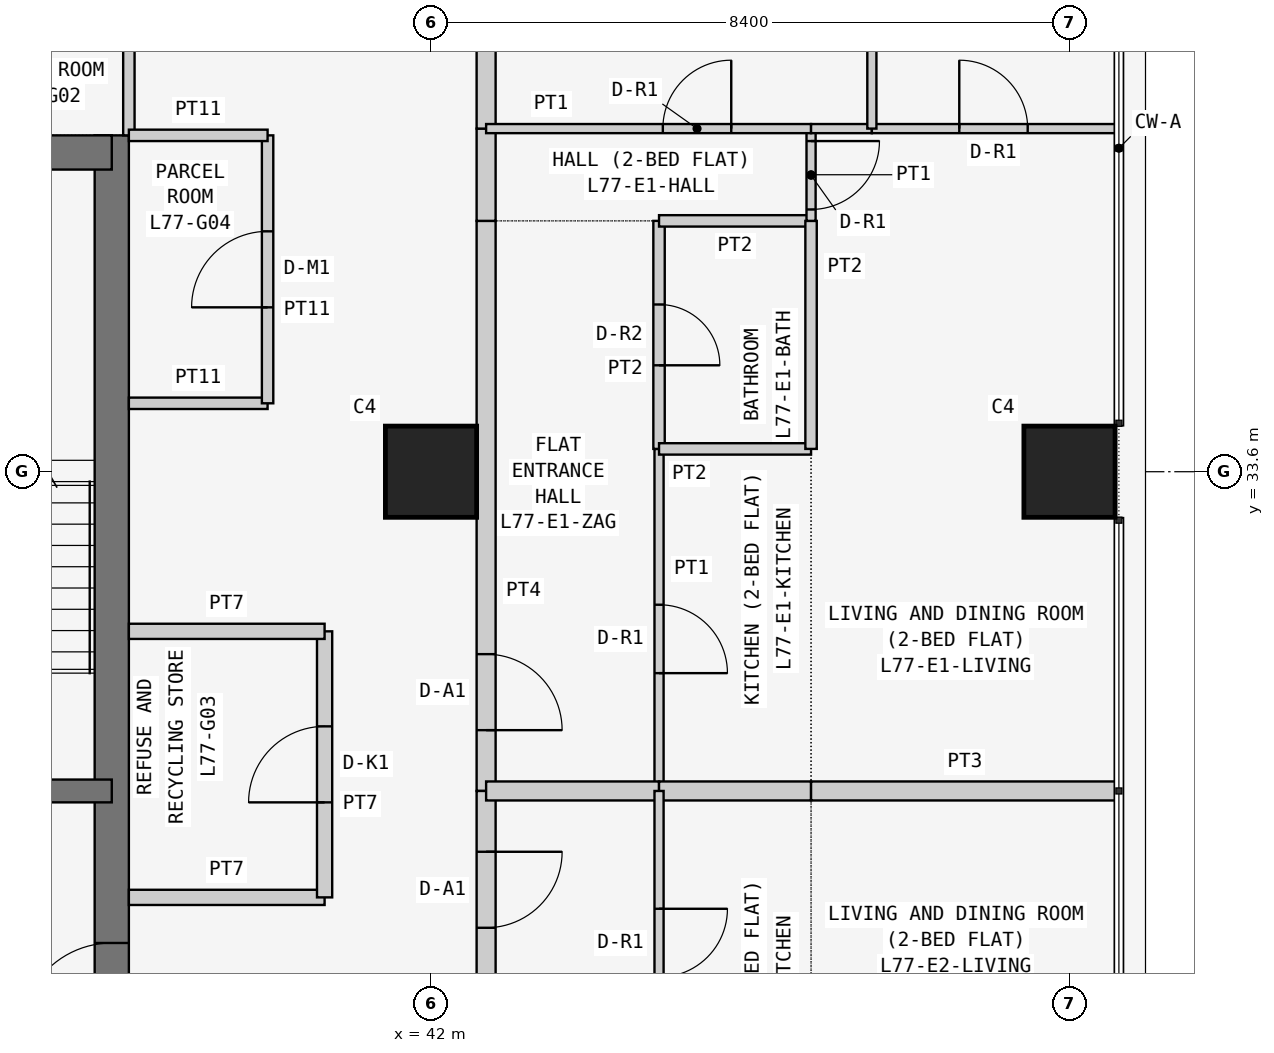
"""IFC4 building model, lengths in metres.
Left out: names, types, materials, properties, quantities, classifications, styles, units other than length and angle.
Written with IfcOpenShell. Run it as: python <this file> out.ifc"""

import sys

from ifc_helpers import new_model, si_unit, direction, frame, frame_2d, origin, origin_2d, place, context, subcontext, project, spatial, rectangle, extrude, element, fill, save


model = new_model("IFC4")
c1 = context("Model", 3, precision=1e-05, world=origin(), true_north=direction((0.0, 1.0)))
c2 = subcontext(c1, "Body", "Model", "MODEL_VIEW")
j1 = project(units=[si_unit("LENGTHUNIT", "METRE"), si_unit("PLANEANGLEUNIT", "RADIAN")], contexts=[c1])
p1 = place(None, origin())
s1 = spatial("IfcSite", under=j1, at=p1, CompositionType="ELEMENT")
p2 = place(p1, origin())
s2 = spatial("IfcBuilding", under=s1, at=p2, CompositionType="ELEMENT")
p3 = place(p2, frame((0.0, 0.0, 293.7)))
s3 = spatial("IfcBuildingStorey", under=s2, at=p3, CompositionType="ELEMENT", Elevation=293.7)
for number, where, z_axis, x_axis in (
    (1, (42.0, 33.6, 0.0), (0.0, 0.0, 1.0), (1.0, 0.0, 0.0)),
    (2, (50.4, 33.6, 0.0), (0.0, 0.0, 1.0), (1.0, 0.0, 0.0)),
):
    element("IfcColumn", number, at=place(p3, frame(where, z_axis=z_axis, x_axis=x_axis)), inside=s3, PredefinedType="COLUMN", context=c2, shape_type="SweptSolid", body=[
        extrude(rectangle(XDim=1.2, YDim=1.2, at=origin_2d()), origin(), (0.0, 0.0, 1.0), 3.6),
    ])
p4 = place(p3, frame((37.8, 21.0, 0.0), z_axis=(0.0, 0.0, 1.0), x_axis=(0.0, 1.0, 0.0)))
e3 = element("IfcWall", 3, at=p4, inside=s3, PredefinedType="SHEAR", context=c2, shape_type="SweptSolid", body=[
    extrude(rectangle(XDim=17.025, YDim=0.45, at=frame_2d((8.512, 0.0))), origin(), (0.0, 0.0, 1.0), 3.6),
])
p5 = place(p4, frame((5.2, 0.0, 0.0)))
e4 = element("IfcOpeningElement", 4, at=p5, cuts=e3, PredefinedType="OPENING", context=c2, shape_type="SweptSolid", body=[
    extrude(rectangle(XDim=1.2, YDim=2.1, at=frame_2d((0.6, 1.05))), frame((0.0, 0.235, 0.0), z_axis=(0.0, -1.0, 0.0), x_axis=(1.0, 0.0, 0.0)), (0.0, 0.0, 1.0), 0.47),
])
p6 = place(p3, frame((37.8, 37.8, 0.0), z_axis=(0.0, 0.0, 1.0), x_axis=(-1.0, 0.0, 0.0)))
e5 = element("IfcWall", 5, at=p6, inside=s3, PredefinedType="SHEAR", context=c2, shape_type="SweptSolid", body=[
    extrude(rectangle(XDim=17.025, YDim=0.45, at=frame_2d((8.513, 0.0))), origin(), (0.0, 0.0, 1.0), 3.6),
])
p7 = place(p3, frame((32.2, 29.4, 0.0), z_axis=(0.0, 0.0, 1.0), x_axis=(1.0, 0.0, 0.0)))
e6 = element("IfcWall", 6, at=p7, inside=s3, PredefinedType="SHEAR", context=c2, shape_type="SweptSolid", body=[
    extrude(rectangle(XDim=5.6, YDim=0.3, at=frame_2d((2.8, 0.0))), origin(), (0.0, 0.0, 1.0), 3.6),
])
p8 = place(p7, frame((2.0, 0.0, 0.0)))
e7 = element("IfcOpeningElement", 7, at=p8, cuts=e6, PredefinedType="OPENING", context=c2, shape_type="SweptSolid", body=[
    extrude(rectangle(XDim=1.2, YDim=2.1, at=frame_2d((0.6, 1.05))), frame((0.0, 0.16, 0.0), z_axis=(0.0, -1.0, 0.0), x_axis=(1.0, 0.0, 0.0)), (0.0, 0.0, 1.0), 0.32),
])
p9 = place(p3, frame((38.025, 38.025, 0.0), z_axis=(0.0, 0.0, 1.0), x_axis=(0.0, 1.0, 0.0)))
e8 = element("IfcWall", 8, at=p9, inside=s3, PredefinedType="PARTITIONING", context=c2, shape_type="SweptSolid", body=[
    extrude(rectangle(XDim=2.575, YDim=0.15, at=frame_2d((1.288, 0.0))), origin(), (0.0, 0.0, 1.0), 3.45),
])
p10 = place(p3, frame((38.025, 28.0, 0.0), z_axis=(0.0, 0.0, 1.0), x_axis=(1.0, 0.0, 0.0)))
e9 = element("IfcWall", 9, at=p10, inside=s3, PredefinedType="PARTITIONING", context=c2, shape_type="SweptSolid", body=[
    extrude(rectangle(XDim=2.575, YDim=0.2, at=frame_2d((1.288, 0.0))), origin(), (0.0, 0.0, 1.0), 3.45),
])
p11 = place(p3, frame((40.6, 28.0, 0.0), z_axis=(0.0, 0.0, 1.0), x_axis=(0.0, 1.0, 0.0)))
e10 = element("IfcWall", 10, at=p11, inside=s3, PredefinedType="PARTITIONING", context=c2, shape_type="SweptSolid", body=[
    extrude(rectangle(XDim=3.5, YDim=0.2, at=frame_2d((1.75, 0.0))), origin(), (0.0, 0.0, 1.0), 3.45),
])
p12 = place(p11, frame((1.25, 0.0, 0.0)))
e11 = element("IfcOpeningElement", 11, at=p12, cuts=e10, PredefinedType="OPENING", context=c2, shape_type="SweptSolid", body=[
    extrude(rectangle(XDim=1.0, YDim=2.1, at=frame_2d((0.5, 1.05))), frame((0.0, 0.11, 0.0), z_axis=(0.0, -1.0, 0.0), x_axis=(1.0, 0.0, 0.0)), (0.0, 0.0, 1.0), 0.22),
])
p13 = place(p3, frame((40.6, 31.5, 0.0), z_axis=(0.0, 0.0, 1.0), x_axis=(-1.0, 0.0, 0.0)))
e12 = element("IfcWall", 12, at=p13, inside=s3, PredefinedType="PARTITIONING", context=c2, shape_type="SweptSolid", body=[
    extrude(rectangle(XDim=2.575, YDim=0.2, at=frame_2d((1.288, 0.0))), origin(), (0.0, 0.0, 1.0), 3.45),
])
p14 = place(p3, frame((38.025, 34.5, 0.0), z_axis=(0.0, 0.0, 1.0), x_axis=(1.0, 0.0, 0.0)))
e13 = element("IfcWall", 13, at=p14, inside=s3, PredefinedType="PARTITIONING", context=c2, shape_type="SweptSolid", body=[
    extrude(rectangle(XDim=1.825, YDim=0.15, at=frame_2d((0.913, 0.0))), origin(), (0.0, 0.0, 1.0), 3.45),
])
p15 = place(p3, frame((39.85, 34.5, 0.0), z_axis=(0.0, 0.0, 1.0), x_axis=(0.0, 1.0, 0.0)))
e14 = element("IfcWall", 14, at=p15, inside=s3, PredefinedType="PARTITIONING", context=c2, shape_type="SweptSolid", body=[
    extrude(rectangle(XDim=3.525, YDim=0.15, at=frame_2d((1.762, 0.0))), origin(), (0.0, 0.0, 1.0), 3.45),
])
p16 = place(p15, frame((1.262, 0.0, 0.0)))
e15 = element("IfcOpeningElement", 15, at=p16, cuts=e14, PredefinedType="OPENING", context=c2, shape_type="SweptSolid", body=[
    extrude(rectangle(XDim=1.0, YDim=2.1, at=frame_2d((0.5, 1.05))), frame((0.0, 0.085, 0.0), z_axis=(0.0, -1.0, 0.0), x_axis=(1.0, 0.0, 0.0)), (0.0, 0.0, 1.0), 0.17),
])
p17 = place(p3, frame((39.85, 38.025, 0.0), z_axis=(0.0, 0.0, 1.0), x_axis=(-1.0, 0.0, 0.0)))
e16 = element("IfcWall", 16, at=p17, inside=s3, PredefinedType="PARTITIONING", context=c2, shape_type="SweptSolid", body=[
    extrude(rectangle(XDim=1.825, YDim=0.15, at=frame_2d((0.913, 0.0))), origin(), (0.0, 0.0, 1.0), 3.45),
])
p18 = place(p3, frame((42.725, 36.9, 0.0), z_axis=(0.0, 0.0, 1.0), x_axis=(0.0, -1.0, 0.0)))
e17 = element("IfcWall", 17, at=p18, inside=s3, PredefinedType="PARTITIONING", context=c2, shape_type="SweptSolid", body=[
    extrude(rectangle(XDim=7.5, YDim=0.25, at=frame_2d((3.75, 0.0))), origin(), (0.0, 0.0, 1.0), 3.45),
])
p19 = place(p18, frame((5.7, 0.0, 0.0)))
e18 = element("IfcOpeningElement", 18, at=p19, cuts=e17, PredefinedType="OPENING", context=c2, shape_type="SweptSolid", body=[
    extrude(rectangle(XDim=1.0, YDim=2.1, at=frame_2d((0.5, 1.05))), frame((0.0, 0.135, 0.0), z_axis=(0.0, -1.0, 0.0), x_axis=(1.0, 0.0, 0.0)), (0.0, 0.0, 1.0), 0.27),
])
p20 = place(p3, frame((42.725, 38.114, 0.0), z_axis=(0.0, 0.0, 1.0), x_axis=(0.0, -1.0, 0.0)))
e19 = element("IfcWall", 19, at=p20, inside=s3, PredefinedType="PARTITIONING", context=c2, shape_type="SweptSolid", body=[
    extrude(rectangle(XDim=1.214, YDim=0.25, at=frame_2d((0.607, 0.0))), origin(), (0.0, 0.0, 1.0), 3.45),
])
p21 = place(p3, frame((42.725, 42.7, 0.0), z_axis=(0.0, 0.0, 1.0), x_axis=(0.0, -1.0, 0.0)))
e20 = element("IfcWall", 20, at=p21, inside=s3, PredefinedType="PARTITIONING", context=c2, shape_type="SweptSolid", body=[
    extrude(rectangle(XDim=4.586, YDim=0.25, at=frame_2d((2.293, 0.0))), origin(), (0.0, 0.0, 1.0), 3.45),
])
p22 = place(p3, frame((42.725, 29.4, 0.0), z_axis=(0.0, 0.0, 1.0), x_axis=(0.0, -1.0, 0.0)))
e21 = element("IfcWall", 21, at=p22, inside=s3, PredefinedType="PARTITIONING", context=c2, shape_type="SweptSolid", body=[
    extrude(rectangle(XDim=7.5, YDim=0.25, at=frame_2d((3.75, 0.0))), origin(), (0.0, 0.0, 1.0), 3.45),
])
p23 = place(p22, frame((0.8, 0.0, 0.0)))
e22 = element("IfcOpeningElement", 22, at=p23, cuts=e21, PredefinedType="OPENING", context=c2, shape_type="SweptSolid", body=[
    extrude(rectangle(XDim=1.0, YDim=2.1, at=frame_2d((0.5, 1.05))), frame((0.0, 0.135, 0.0), z_axis=(0.0, -1.0, 0.0), x_axis=(1.0, 0.0, 0.0)), (0.0, 0.0, 1.0), 0.27),
])
p24 = place(p3, frame((45.0, 29.4, 0.0), z_axis=(0.0, 0.0, 1.0), x_axis=(0.0, 1.0, 0.0)))
e23 = element("IfcWall", 23, at=p24, inside=s3, PredefinedType="PARTITIONING", context=c2, shape_type="SweptSolid", body=[
    extrude(rectangle(XDim=4.5, YDim=0.12, at=frame_2d((2.25, 0.0))), origin(), (0.0, 0.0, 1.0), 3.45),
])
p25 = place(p24, frame((1.55, 0.0, 0.0)))
e24 = element("IfcOpeningElement", 24, at=p25, cuts=e23, PredefinedType="OPENING", context=c2, shape_type="SweptSolid", body=[
    extrude(rectangle(XDim=0.9, YDim=2.1, at=frame_2d((0.45, 1.05))), frame((0.0, 0.07, 0.0), z_axis=(0.0, -1.0, 0.0), x_axis=(1.0, 0.0, 0.0)), (0.0, 0.0, 1.0), 0.14),
])
p26 = place(p3, frame((45.0, 33.9, 0.0), z_axis=(0.0, 0.0, 1.0), x_axis=(0.0, 1.0, 0.0)))
e25 = element("IfcWall", 25, at=p26, inside=s3, PredefinedType="PARTITIONING", context=c2, shape_type="SweptSolid", body=[
    extrude(rectangle(XDim=3.0, YDim=0.15, at=frame_2d((1.5, 0.0))), origin(), (0.0, 0.0, 1.0), 3.45),
])
p27 = place(p26, frame((1.1, 0.0, 0.0)))
e26 = element("IfcOpeningElement", 26, at=p27, cuts=e25, PredefinedType="OPENING", context=c2, shape_type="SweptSolid", body=[
    extrude(rectangle(XDim=0.8, YDim=2.1, at=frame_2d((0.4, 1.05))), frame((0.0, 0.085, 0.0), z_axis=(0.0, -1.0, 0.0), x_axis=(1.0, 0.0, 0.0)), (0.0, 0.0, 1.0), 0.17),
])
p28 = place(p3, frame((42.725, 29.4, 0.0), z_axis=(0.0, 0.0, 1.0), x_axis=(1.0, 0.0, 0.0)))
e27 = element("IfcWall", 27, at=p28, inside=s3, PredefinedType="PARTITIONING", context=c2, shape_type="SweptSolid", body=[
    extrude(rectangle(XDim=2.275, YDim=0.25, at=frame_2d((1.137, 0.0))), origin(), (0.0, 0.0, 1.0), 3.45),
])
p29 = place(p3, frame((47.0, 33.9, 0.0), z_axis=(0.0, 0.0, 1.0), x_axis=(-1.0, 0.0, 0.0)))
e28 = element("IfcWall", 28, at=p29, inside=s3, PredefinedType="PARTITIONING", context=c2, shape_type="SweptSolid", body=[
    extrude(rectangle(XDim=2.0, YDim=0.15, at=frame_2d((1.0, 0.0))), origin(), (0.0, 0.0, 1.0), 3.45),
])
p30 = place(p3, frame((45.0, 29.4, 0.0), z_axis=(0.0, 0.0, 1.0), x_axis=(1.0, 0.0, 0.0)))
e29 = element("IfcWall", 29, at=p30, inside=s3, PredefinedType="PARTITIONING", context=c2, shape_type="SweptSolid", body=[
    extrude(rectangle(XDim=2.0, YDim=0.25, at=frame_2d((1.0, 0.0))), origin(), (0.0, 0.0, 1.0), 3.45),
])
p31 = place(p3, frame((47.0, 36.9, 0.0), z_axis=(0.0, 0.0, 1.0), x_axis=(-1.0, 0.0, 0.0)))
e30 = element("IfcWall", 30, at=p31, inside=s3, PredefinedType="PARTITIONING", context=c2, shape_type="SweptSolid", body=[
    extrude(rectangle(XDim=2.0, YDim=0.15, at=frame_2d((1.0, 0.0))), origin(), (0.0, 0.0, 1.0), 3.45),
])
p32 = place(p3, frame((47.0, 33.9, 0.0), z_axis=(0.0, 0.0, 1.0), x_axis=(0.0, 1.0, 0.0)))
e31 = element("IfcWall", 31, at=p32, inside=s3, PredefinedType="PARTITIONING", context=c2, shape_type="SweptSolid", body=[
    extrude(rectangle(XDim=3.0, YDim=0.15, at=frame_2d((1.5, 0.0))), origin(), (0.0, 0.0, 1.0), 3.45),
])
p33 = place(p3, frame((47.0, 36.9, 0.0), z_axis=(0.0, 0.0, 1.0), x_axis=(0.0, 1.0, 0.0)))
e32 = element("IfcWall", 32, at=p33, inside=s3, PredefinedType="PARTITIONING", context=c2, shape_type="SweptSolid", body=[
    extrude(rectangle(XDim=1.214, YDim=0.12, at=frame_2d((0.607, 0.0))), origin(), (0.0, 0.0, 1.0), 3.45),
])
p34 = place(p33, frame((0.15, 0.0, 0.0)))
e33 = element("IfcOpeningElement", 33, at=p34, cuts=e32, PredefinedType="OPENING", context=c2, shape_type="SweptSolid", body=[
    extrude(rectangle(XDim=0.9, YDim=2.1, at=frame_2d((0.45, 1.05))), frame((0.0, 0.07, 0.0), z_axis=(0.0, -1.0, 0.0), x_axis=(1.0, 0.0, 0.0)), (0.0, 0.0, 1.0), 0.14),
])
p35 = place(p3, frame((47.0, 38.114, 0.0), z_axis=(0.0, 0.0, 1.0), x_axis=(-1.0, 0.0, 0.0)))
e34 = element("IfcWall", 34, at=p35, inside=s3, PredefinedType="PARTITIONING", context=c2, shape_type="SweptSolid", body=[
    extrude(rectangle(XDim=4.275, YDim=0.12, at=frame_2d((2.137, 0.0))), origin(), (0.0, 0.0, 1.0), 3.45),
])
p36 = place(p35, frame((1.05, 0.0, 0.0)))
e35 = element("IfcOpeningElement", 35, at=p36, cuts=e34, PredefinedType="OPENING", context=c2, shape_type="SweptSolid", body=[
    extrude(rectangle(XDim=0.9, YDim=2.1, at=frame_2d((0.45, 1.05))), frame((0.0, 0.07, 0.0), z_axis=(0.0, -1.0, 0.0), x_axis=(1.0, 0.0, 0.0)), (0.0, 0.0, 1.0), 0.14),
])
p37 = place(p3, frame((47.8, 38.114, 0.0), z_axis=(0.0, 0.0, 1.0), x_axis=(-1.0, 0.0, 0.0)))
e36 = element("IfcWall", 36, at=p37, inside=s3, PredefinedType="PARTITIONING", context=c2, shape_type="SweptSolid", body=[
    extrude(rectangle(XDim=0.8, YDim=0.12, at=frame_2d((0.4, 0.0))), origin(), (0.0, 0.0, 1.0), 3.45),
])
p38 = place(p3, frame((51.05, 38.114, 0.0), z_axis=(0.0, 0.0, 1.0), x_axis=(-1.0, 0.0, 0.0)))
e37 = element("IfcWall", 37, at=p38, inside=s3, PredefinedType="PARTITIONING", context=c2, shape_type="SweptSolid", body=[
    extrude(rectangle(XDim=3.25, YDim=0.12, at=frame_2d((1.625, 0.0))), origin(), (0.0, 0.0, 1.0), 3.45),
])
p39 = place(p38, frame((1.2, 0.0, 0.0)))
e38 = element("IfcOpeningElement", 38, at=p39, cuts=e37, PredefinedType="OPENING", context=c2, shape_type="SweptSolid", body=[
    extrude(rectangle(XDim=0.9, YDim=2.1, at=frame_2d((0.45, 1.05))), frame((0.0, 0.07, 0.0), z_axis=(0.0, -1.0, 0.0), x_axis=(1.0, 0.0, 0.0)), (0.0, 0.0, 1.0), 0.14),
])
p40 = place(p3, frame((47.0, 29.4, 0.0), z_axis=(0.0, 0.0, 1.0), x_axis=(1.0, 0.0, 0.0)))
e39 = element("IfcWall", 39, at=p40, inside=s3, PredefinedType="PARTITIONING", context=c2, shape_type="SweptSolid", body=[
    extrude(rectangle(XDim=4.05, YDim=0.25, at=frame_2d((2.025, 0.0))), origin(), (0.0, 0.0, 1.0), 3.45),
])
p41 = place(p3, frame((47.8, 38.114, 0.0), z_axis=(0.0, 0.0, 1.0), x_axis=(0.0, 1.0, 0.0)))
e40 = element("IfcWall", 40, at=p41, inside=s3, PredefinedType="PARTITIONING", context=c2, shape_type="SweptSolid", body=[
    extrude(rectangle(XDim=4.586, YDim=0.12, at=frame_2d((2.293, 0.0))), origin(), (0.0, 0.0, 1.0), 3.45),
])
p42 = place(p3, frame((45.0, 29.4, 0.0), z_axis=(0.0, 0.0, 1.0), x_axis=(0.0, -1.0, 0.0)))
e41 = element("IfcWall", 41, at=p42, inside=s3, PredefinedType="PARTITIONING", context=c2, shape_type="SweptSolid", body=[
    extrude(rectangle(XDim=4.5, YDim=0.12, at=frame_2d((2.25, 0.0))), origin(), (0.0, 0.0, 1.0), 3.45),
])
p43 = place(p42, frame((1.55, 0.0, 0.0)))
e42 = element("IfcOpeningElement", 42, at=p43, cuts=e41, PredefinedType="OPENING", context=c2, shape_type="SweptSolid", body=[
    extrude(rectangle(XDim=0.9, YDim=2.1, at=frame_2d((0.45, 1.05))), frame((0.0, 0.07, 0.0), z_axis=(0.0, -1.0, 0.0), x_axis=(1.0, 0.0, 0.0)), (0.0, 0.0, 1.0), 0.14),
])
p44 = place(p12, origin())
e43 = element("IfcDoor", 43, at=p44, inside=s3, OperationType="SINGLE_SWING_LEFT", PredefinedType="DOOR", context=c2, shape_type="SweptSolid", body=[
    extrude(rectangle(XDim=1.0, YDim=2.1, at=frame_2d((0.5, 1.05))), frame((0.0, 0.025, 0.0), z_axis=(0.0, -1.0, 0.0), x_axis=(1.0, 0.0, 0.0)), (0.0, 0.0, 1.0), 0.05),
])
fill(e11, e43)
p45 = place(p16, origin())
e44 = element("IfcDoor", 44, at=p45, inside=s3, OperationType="SINGLE_SWING_LEFT", PredefinedType="DOOR", context=c2, shape_type="SweptSolid", body=[
    extrude(rectangle(XDim=1.0, YDim=2.1, at=frame_2d((0.5, 1.05))), frame((0.0, 0.025, 0.0), z_axis=(0.0, -1.0, 0.0), x_axis=(1.0, 0.0, 0.0)), (0.0, 0.0, 1.0), 0.05),
])
fill(e15, e44)
p46 = place(p19, origin())
e45 = element("IfcDoor", 45, at=p46, inside=s3, OperationType="SINGLE_SWING_RIGHT", PredefinedType="DOOR", context=c2, shape_type="SweptSolid", body=[
    extrude(rectangle(XDim=1.0, YDim=2.1, at=frame_2d((0.5, 1.05))), frame((0.0, 0.025, 0.0), z_axis=(0.0, -1.0, 0.0), x_axis=(1.0, 0.0, 0.0)), (0.0, 0.0, 1.0), 0.05),
])
fill(e18, e45)
p47 = place(p25, frame((0.9, 0.0, 0.0), z_axis=(0.0, 0.0, 1.0), x_axis=(-1.0, 0.0, 0.0)))
e46 = element("IfcDoor", 46, at=p47, inside=s3, OperationType="SINGLE_SWING_RIGHT", PredefinedType="DOOR", context=c2, shape_type="SweptSolid", body=[
    extrude(rectangle(XDim=0.9, YDim=2.1, at=frame_2d((0.45, 1.05))), frame((0.0, 0.025, 0.0), z_axis=(0.0, -1.0, 0.0), x_axis=(1.0, 0.0, 0.0)), (0.0, 0.0, 1.0), 0.05),
])
fill(e24, e46)
p48 = place(p27, frame((0.8, 0.0, 0.0), z_axis=(0.0, 0.0, 1.0), x_axis=(-1.0, 0.0, 0.0)))
e47 = element("IfcDoor", 47, at=p48, inside=s3, OperationType="SINGLE_SWING_RIGHT", PredefinedType="DOOR", context=c2, shape_type="SweptSolid", body=[
    extrude(rectangle(XDim=0.8, YDim=2.1, at=frame_2d((0.4, 1.05))), frame((0.0, 0.025, 0.0), z_axis=(0.0, -1.0, 0.0), x_axis=(1.0, 0.0, 0.0)), (0.0, 0.0, 1.0), 0.05),
])
fill(e26, e47)
p49 = place(p34, frame((0.9, 0.0, 0.0), z_axis=(0.0, 0.0, 1.0), x_axis=(-1.0, 0.0, 0.0)))
e48 = element("IfcDoor", 48, at=p49, inside=s3, OperationType="SINGLE_SWING_LEFT", PredefinedType="DOOR", context=c2, shape_type="SweptSolid", body=[
    extrude(rectangle(XDim=0.9, YDim=2.1, at=frame_2d((0.45, 1.05))), frame((0.0, 0.025, 0.0), z_axis=(0.0, -1.0, 0.0), x_axis=(1.0, 0.0, 0.0)), (0.0, 0.0, 1.0), 0.05),
])
fill(e33, e48)
p50 = place(p36, frame((0.9, 0.0, 0.0), z_axis=(0.0, 0.0, 1.0), x_axis=(-1.0, 0.0, 0.0)))
e49 = element("IfcDoor", 49, at=p50, inside=s3, OperationType="SINGLE_SWING_RIGHT", PredefinedType="DOOR", context=c2, shape_type="SweptSolid", body=[
    extrude(rectangle(XDim=0.9, YDim=2.1, at=frame_2d((0.45, 1.05))), frame((0.0, 0.025, 0.0), z_axis=(0.0, -1.0, 0.0), x_axis=(1.0, 0.0, 0.0)), (0.0, 0.0, 1.0), 0.05),
])
fill(e35, e49)
p51 = place(p39, frame((0.9, 0.0, 0.0), z_axis=(0.0, 0.0, 1.0), x_axis=(-1.0, 0.0, 0.0)))
e50 = element("IfcDoor", 50, at=p51, inside=s3, OperationType="SINGLE_SWING_LEFT", PredefinedType="DOOR", context=c2, shape_type="SweptSolid", body=[
    extrude(rectangle(XDim=0.9, YDim=2.1, at=frame_2d((0.45, 1.05))), frame((0.0, 0.025, 0.0), z_axis=(0.0, -1.0, 0.0), x_axis=(1.0, 0.0, 0.0)), (0.0, 0.0, 1.0), 0.05),
])
fill(e38, e50)
p52 = place(p23, origin())
e51 = element("IfcDoor", 51, at=p52, inside=s3, OperationType="SINGLE_SWING_LEFT", PredefinedType="DOOR", context=c2, shape_type="SweptSolid", body=[
    extrude(rectangle(XDim=1.0, YDim=2.1, at=frame_2d((0.5, 1.05))), frame((0.0, 0.025, 0.0), z_axis=(0.0, -1.0, 0.0), x_axis=(1.0, 0.0, 0.0)), (0.0, 0.0, 1.0), 0.05),
])
fill(e22, e51)
p53 = place(p43, origin())
e52 = element("IfcDoor", 52, at=p53, inside=s3, OperationType="SINGLE_SWING_LEFT", PredefinedType="DOOR", context=c2, shape_type="SweptSolid", body=[
    extrude(rectangle(XDim=0.9, YDim=2.1, at=frame_2d((0.45, 1.05))), frame((0.0, 0.025, 0.0), z_axis=(0.0, -1.0, 0.0), x_axis=(1.0, 0.0, 0.0)), (0.0, 0.0, 1.0), 0.05),
])
fill(e42, e52)
p54 = place(p5, origin())
e53 = element("IfcDoor", 53, at=p54, inside=s3, OperationType="SINGLE_SWING_LEFT", PredefinedType="DOOR", context=c2, shape_type="SweptSolid", body=[
    extrude(rectangle(XDim=1.2, YDim=2.1, at=frame_2d((0.6, 1.05))), frame((0.0, 0.025, 0.0), z_axis=(0.0, -1.0, 0.0), x_axis=(1.0, 0.0, 0.0)), (0.0, 0.0, 1.0), 0.05),
])
fill(e4, e53)
save(model, sys.argv[1])
